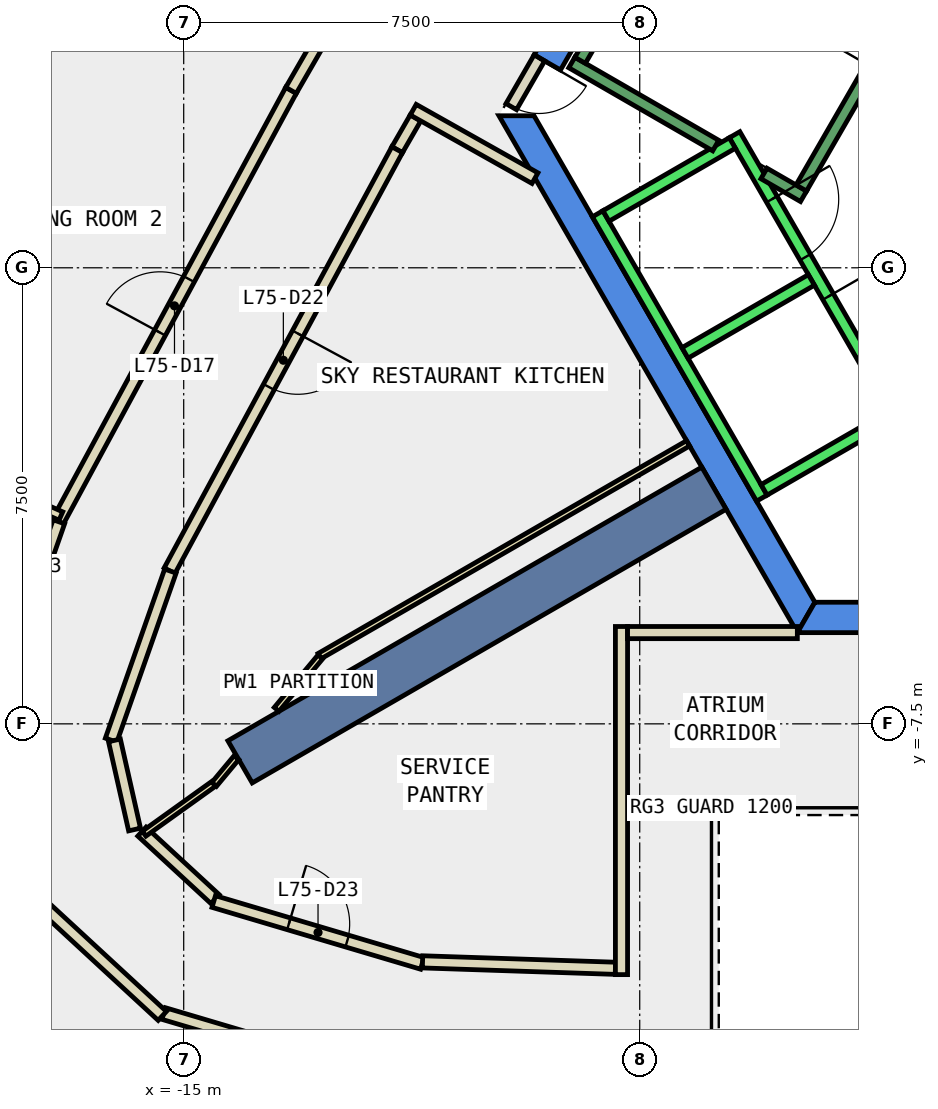
"""IFC4 building model, lengths in metres.
Left out: names, types, materials, properties, quantities, classifications, styles, units other than length and angle.
Written with IfcOpenShell. Run it as: python <this file> out.ifc"""

import sys

from ifc_helpers import new_model, si_unit, direction, frame, frame_2d, origin, place, context, subcontext, project, spatial, polyline, rectangle, outline, extrude, element, fill, save


model = new_model("IFC4")
c1 = context("Model", 3, precision=1e-05, world=origin(), true_north=direction((0.0, 1.0)))
c2 = subcontext(c1, "Body", "Model", "MODEL_VIEW")
j1 = project(units=[si_unit("LENGTHUNIT", "METRE"), si_unit("PLANEANGLEUNIT", "RADIAN")], contexts=[c1])
p1 = place(None, origin())
s1 = spatial("IfcSite", under=j1, at=p1, CompositionType="ELEMENT")
p2 = place(p1, origin())
s2 = spatial("IfcBuilding", under=s1, at=p2, CompositionType="ELEMENT")
p3 = place(p2, frame((0.0, 0.0, 318.8)))
s3 = spatial("IfcBuildingStorey", under=s2, at=p3, CompositionType="ELEMENT", Elevation=318.8)
p4 = place(p3, frame((0.0, 0.0, -0.34)))
e1 = element("IfcWall", 1, at=p4, inside=s3, PredefinedType="SHEAR", context=c2, shape_type="SweptSolid", body=[
    extrude(outline(polyline([(-9.236, 3.502), (-8.803, 3.253), (-4.619, 10.5), (-4.907, 11.0), (-9.236, 3.502)])), origin(), (0.0, 0.0, 1.0), 3.6),
])
p5 = place(p3, frame((0.0, 0.0, -0.34)))
e2 = element("IfcWall", 2, at=p5, inside=s3, PredefinedType="SHEAR", context=c2, shape_type="SweptSolid", body=[
    extrude(outline(polyline([(-9.815, 2.5), (-4.907, -6.0), (-4.619, -5.5), (-9.238, 2.5), (-9.815, 2.5)])), origin(), (0.0, 0.0, 1.0), 3.6),
])
p6 = place(p3, frame((0.0, 0.0, -0.34)))
e3 = element("IfcWall", 3, at=p6, inside=s3, PredefinedType="SHEAR", context=c2, shape_type="SweptSolid", body=[
    extrude(outline(polyline([(3.75, -6.0), (3.75, -5.5), (-4.619, -5.5), (-4.907, -6.0), (3.75, -6.0)])), origin(), (0.0, 0.0, 1.0), 3.6),
])
p7 = place(p3, frame((-6.279, -3.625, -0.34), z_axis=(0.0, 0.0, 1.0), x_axis=(-0.866017533419, -0.500013631625, 0.0)))
e4 = element("IfcWall", 4, at=p7, inside=s3, PredefinedType="SHEAR", context=c2, shape_type="SweptSolid", body=[
    extrude(rectangle(XDim=9.0, YDim=0.8, at=frame_2d((4.5, 0.0))), origin(), (0.0, 0.0, 1.0), 3.6),
])
p8 = place(p3, frame((-11.188, 2.464, 0.0), z_axis=(0.0, 0.0, 1.0), x_axis=(-0.499406844493, -0.866367591542, 0.0)))
e5 = element("IfcWall", 5, at=p8, inside=s3, PredefinedType="PARTITIONING", context=c2, shape_type="SweptSolid", body=[
    extrude(rectangle(XDim=0.603, YDim=0.2, at=frame_2d((0.301, 0.0))), origin(), (0.0, 0.0, 1.0), 3.26),
])
p9 = place(p3, frame((-11.489, 1.942, 0.0), z_axis=(0.0, 0.0, 1.0), x_axis=(-0.475643534049, -0.879638123615, 0.0)))
e6 = element("IfcWall", 6, at=p9, inside=s3, PredefinedType="PARTITIONING", context=c2, shape_type="SweptSolid", body=[
    extrude(rectangle(XDim=7.871, YDim=0.2, at=frame_2d((3.936, 0.0))), origin(), (0.0, 0.0, 1.0), 3.26),
])
p10 = place(p9, frame((3.436, 0.0, 0.0)))
e7 = element("IfcOpeningElement", 7, at=p10, cuts=e6, PredefinedType="OPENING", context=c2, shape_type="SweptSolid", body=[
    extrude(rectangle(XDim=1.0, YDim=2.1, at=frame_2d((0.5, 1.05))), frame((0.0, 0.11, 0.0), z_axis=(0.0, -1.0, 0.0), x_axis=(1.0, 0.0, 0.0)), (0.0, 0.0, 1.0), 0.22),
])
p11 = place(p3, frame((-15.219, -4.988, 0.0), z_axis=(0.0, 0.0, 1.0), x_axis=(-0.330981563235, -0.943637220969, 0.0)))
e8 = element("IfcWall", 8, at=p11, inside=s3, PredefinedType="PARTITIONING", context=c2, shape_type="SweptSolid", body=[
    extrude(rectangle(XDim=2.946, YDim=0.2, at=frame_2d((1.473, 0.0))), origin(), (0.0, 0.0, 1.0), 3.26),
])
p12 = place(p3, frame((-16.139, -7.772, 0.0), z_axis=(0.0, 0.0, 1.0), x_axis=(0.220111291919, -0.975474766034, 0.0)))
e9 = element("IfcWall", 9, at=p12, inside=s3, PredefinedType="PARTITIONING", context=c2, shape_type="SweptSolid", body=[
    extrude(rectangle(XDim=1.503, YDim=0.2, at=frame_2d((0.751, 0.0))), origin(), (0.0, 0.0, 1.0), 3.26),
])
p13 = place(p3, frame((-9.223, 1.474, 0.0), z_axis=(0.0, 0.0, 1.0), x_axis=(-0.871623785844, 0.490175454251, 0.0)))
e10 = element("IfcWall", 10, at=p13, inside=s3, PredefinedType="PARTITIONING", context=c2, shape_type="SweptSolid", body=[
    extrude(rectangle(XDim=2.297, YDim=0.2, at=frame_2d((1.148, 0.0))), origin(), (0.0, 0.0, 1.0), 3.26),
])
p14 = place(p3, frame((-15.687, -9.272, 0.0), z_axis=(0.0, 0.0, 1.0), x_axis=(0.734946370973, -0.67812523312, 0.0)))
e11 = element("IfcWall", 11, at=p14, inside=s3, PredefinedType="PARTITIONING", context=c2, shape_type="SweptSolid", body=[
    extrude(rectangle(XDim=1.637, YDim=0.2, at=frame_2d((0.818, 0.0))), origin(), (0.0, 0.0, 1.0), 3.26),
])
p15 = place(p3, frame((-14.506, -10.422, 0.0), z_axis=(0.0, 0.0, 1.0), x_axis=(0.958760241353, -0.284216114252, 0.0)))
e12 = element("IfcWall", 12, at=p15, inside=s3, PredefinedType="PARTITIONING", context=c2, shape_type="SweptSolid", body=[
    extrude(rectangle(XDim=3.578, YDim=0.2, at=frame_2d((1.789, 0.0))), origin(), (0.0, 0.0, 1.0), 3.26),
])
p16 = place(p15, frame((1.289, 0.0, 0.0)))
e13 = element("IfcOpeningElement", 13, at=p16, cuts=e12, PredefinedType="OPENING", context=c2, shape_type="SweptSolid", body=[
    extrude(rectangle(XDim=1.0, YDim=2.1, at=frame_2d((0.5, 1.05))), frame((0.0, 0.11, 0.0), z_axis=(0.0, -1.0, 0.0), x_axis=(1.0, 0.0, 0.0)), (0.0, 0.0, 1.0), 0.22),
])
p17 = place(p3, frame((-11.072, -11.414, 0.0), z_axis=(0.0, 0.0, 1.0), x_axis=(0.999442599499, -0.033383982774, 0.0)))
e14 = element("IfcWall", 14, at=p17, inside=s3, PredefinedType="PARTITIONING", context=c2, shape_type="SweptSolid", body=[
    extrude(rectangle(XDim=3.174, YDim=0.2, at=frame_2d((1.587, 0.0))), origin(), (0.0, 0.0, 1.0), 3.26),
])
p18 = place(p3, frame((-17.068, -4.17, 0.0), z_axis=(0.0, 0.0, 1.0), x_axis=(0.475681790703, 0.879617436158, 0.0)))
e15 = element("IfcWall", 15, at=p18, inside=s3, PredefinedType="PARTITIONING", context=c2, shape_type="SweptSolid", body=[
    extrude(rectangle(XDim=8.058, YDim=0.2, at=frame_2d((4.029, 0.0))), origin(), (0.0, 0.0, 1.0), 3.26),
])
p19 = place(p18, frame((3.529, 0.0, 0.0)))
e16 = element("IfcOpeningElement", 16, at=p19, cuts=e15, PredefinedType="OPENING", context=c2, shape_type="SweptSolid", body=[
    extrude(rectangle(XDim=1.0, YDim=2.1, at=frame_2d((0.5, 1.05))), frame((0.0, 0.11, 0.0), z_axis=(0.0, -1.0, 0.0), x_axis=(1.0, 0.0, 0.0)), (0.0, 0.0, 1.0), 0.22),
])
p20 = place(p3, frame((-13.235, 2.918, 0.0), z_axis=(0.0, 0.0, 1.0), x_axis=(0.49992599743, 0.866068124973, 0.0)))
e17 = element("IfcWall", 17, at=p20, inside=s3, PredefinedType="PARTITIONING", context=c2, shape_type="SweptSolid", body=[
    extrude(rectangle(XDim=4.015, YDim=0.2, at=frame_2d((2.007, 0.0))), origin(), (0.0, 0.0, 1.0), 3.26),
])
p21 = place(p3, frame((-13.22, -12.889, 0.0), z_axis=(0.0, 0.0, 1.0), x_axis=(-0.958789155152, 0.284118559693, 0.0)))
e18 = element("IfcWall", 18, at=p21, inside=s3, PredefinedType="PARTITIONING", context=c2, shape_type="SweptSolid", body=[
    extrude(rectangle(XDim=2.2, YDim=0.2, at=frame_2d((1.1, 0.0))), origin(), (0.0, 0.0, 1.0), 3.26),
])
p22 = place(p3, frame((-15.352, -12.303, 0.0), z_axis=(0.0, 0.0, 1.0), x_axis=(-0.734786003021, 0.67829899732, 0.0)))
e19 = element("IfcWall", 19, at=p22, inside=s3, PredefinedType="PARTITIONING", context=c2, shape_type="SweptSolid", body=[
    extrude(rectangle(XDim=3.22, YDim=0.2, at=frame_2d((1.61, 0.0))), origin(), (0.0, 0.0, 1.0), 3.26),
])
p23 = place(p3, frame((-18.271, -7.648, 0.0), z_axis=(0.0, 0.0, 1.0), x_axis=(0.33112192567, 0.943587977001, 0.0)))
e20 = element("IfcWall", 20, at=p23, inside=s3, PredefinedType="PARTITIONING", context=c2, shape_type="SweptSolid", body=[
    extrude(rectangle(XDim=3.678, YDim=0.2, at=frame_2d((1.839, 0.0))), origin(), (0.0, 0.0, 1.0), 3.26),
])
p24 = place(p23, frame((1.339, 0.0, 0.0)))
e21 = element("IfcOpeningElement", 21, at=p24, cuts=e20, PredefinedType="OPENING", context=c2, shape_type="SweptSolid", body=[
    extrude(rectangle(XDim=1.0, YDim=2.1, at=frame_2d((0.5, 1.05))), frame((0.0, 0.11, 0.0), z_axis=(0.0, -1.0, 0.0), x_axis=(1.0, 0.0, 0.0)), (0.0, 0.0, 1.0), 0.22),
])
p25 = place(p3, frame((-7.8, -11.624, 0.0), z_axis=(0.0, 0.0, 1.0), x_axis=(0.0, 1.0, 0.0)))
e22 = element("IfcWall", 22, at=p25, inside=s3, PredefinedType="PARTITIONING", context=c2, shape_type="SweptSolid", body=[
    extrude(rectangle(XDim=5.725, YDim=0.2, at=frame_2d((2.863, 0.0))), origin(), (0.0, 0.0, 1.0), 3.26),
])
p26 = place(p3, frame((-7.7, -5.999, 0.0), z_axis=(0.0, 0.0, 1.0), x_axis=(1.0, 0.0, 0.0)))
e23 = element("IfcWall", 23, at=p26, inside=s3, PredefinedType="PARTITIONING", context=c2, shape_type="SweptSolid", body=[
    extrude(rectangle(XDim=2.792, YDim=0.2, at=frame_2d((1.396, 0.0))), origin(), (0.0, 0.0, 1.0), 3.26),
])
p27 = place(p3, frame((-6.705, -2.887, 0.0), z_axis=(0.0, 0.0, 1.0), x_axis=(-0.866001397039, -0.500041578597, 0.0)))
e24 = element("IfcWall", 24, at=p27, inside=s3, PredefinedType="PARTITIONING", context=c2, shape_type="SweptSolid", body=[
    extrude(rectangle(XDim=6.998, YDim=0.1, at=frame_2d((3.499, 0.0))), origin(), (0.0, 0.0, 1.0), 3.26),
])
p28 = place(p3, frame((-12.753, -6.399, 0.0), z_axis=(0.0, 0.0, 1.0), x_axis=(-0.640077503072, -0.768310347491, 0.0)))
e25 = element("IfcWall", 25, at=p28, inside=s3, PredefinedType="PARTITIONING", context=c2, shape_type="SweptSolid", body=[
    extrude(rectangle(XDim=1.123, YDim=0.1, at=frame_2d((0.562, 0.0))), origin(), (0.0, 0.0, 1.0), 3.26),
])
p29 = place(p3, frame((-14.507, -8.486, 0.0), z_axis=(0.0, 0.0, 1.0), x_axis=(-0.812782900134, -0.582566697684, 0.0)))
e26 = element("IfcWall", 26, at=p29, inside=s3, PredefinedType="PARTITIONING", context=c2, shape_type="SweptSolid", body=[
    extrude(rectangle(XDim=1.407, YDim=0.1, at=frame_2d((0.704, 0.0))), origin(), (0.0, 0.0, 1.0), 3.26),
])
p30 = place(p3, frame((-17.02, -4.082, 0.0), z_axis=(0.0, 0.0, 1.0), x_axis=(-0.914599611743, 0.404360668462, 0.0)))
e27 = element("IfcWall", 27, at=p30, inside=s3, PredefinedType="PARTITIONING", context=c2, shape_type="SweptSolid", body=[
    extrude(rectangle(XDim=4.296, YDim=0.15, at=frame_2d((2.148, 0.0))), origin(), (0.0, 0.0, 1.0), 3.26),
])
p31 = place(p3, frame((-9.15, 3.452, 0.0), z_axis=(0.0, 0.0, 1.0), x_axis=(-0.500079945886, -0.865979242085, 0.0)))
e28 = element("IfcWall", 28, at=p31, inside=s3, PredefinedType="PARTITIONING", context=c2, shape_type="SweptSolid", body=[
    extrude(rectangle(XDim=0.926, YDim=0.2, at=frame_2d((0.463, 0.0))), origin(), (0.0, 0.0, 1.0), 2.4),
])
p32 = place(p31, frame((0.017, 0.0, 0.0)))
e29 = element("IfcOpeningElement", 29, at=p32, cuts=e28, PredefinedType="OPENING", context=c2, shape_type="SweptSolid", body=[
    extrude(rectangle(XDim=0.9, YDim=2.1, at=frame_2d((0.45, 1.05))), frame((0.0, 0.11, 0.0), z_axis=(0.0, -1.0, 0.0), x_axis=(1.0, 0.0, 0.0)), (0.0, 0.0, 1.0), 0.22),
])
p33 = place(p3, frame((-14.133, -8.056, 0.0), z_axis=(0.0, 0.0, 1.0), x_axis=(-0.640142394154, -0.768256282244, 0.0)))
e30 = element("IfcWall", 30, at=p33, inside=s3, PredefinedType="PARTITIONING", context=c2, shape_type="SweptSolid", body=[
    extrude(rectangle(XDim=0.572, YDim=0.1, at=frame_2d((0.286, 0.0))), origin(), (0.0, 0.0, 1.0), 3.26),
])
p34 = place(p3, frame((-5.94, 2.188, 0.0), z_axis=(0.0, 0.0, 1.0), x_axis=(0.500034260056, -0.866005622828, 0.0)))
e31 = element("IfcWall", 31, at=p34, inside=s3, PredefinedType="STANDARD", context=c2, shape_type="SweptSolid", body=[
    extrude(rectangle(XDim=5.399, YDim=0.2, at=frame_2d((2.7, 0.0))), origin(), (0.0, 0.0, 1.0), 3.26),
])
p35 = place(p34, frame((3.075, 0.0, 0.0)))
e32 = element("IfcOpeningElement", 32, at=p35, cuts=e31, PredefinedType="OPENING", context=c2, shape_type="SweptSolid", body=[
    extrude(rectangle(XDim=1.1, YDim=2.1, at=frame_2d((0.55, 1.05))), frame((0.0, 0.11, 0.0), z_axis=(0.0, -1.0, 0.0), x_axis=(1.0, 0.0, 0.0)), (0.0, 0.0, 1.0), 0.22),
])
p36 = place(p34, frame((1.225, 0.0, 0.0)))
e33 = element("IfcOpeningElement", 33, at=p36, cuts=e31, PredefinedType="OPENING", context=c2, shape_type="SweptSolid", body=[
    extrude(rectangle(XDim=1.1, YDim=2.1, at=frame_2d((0.55, 1.05))), frame((0.0, 0.11, 0.0), z_axis=(0.0, -1.0, 0.0), x_axis=(1.0, 0.0, 0.0)), (0.0, 0.0, 1.0), 0.22),
])
p37 = place(p3, frame((-8.192, 0.888, 0.0), z_axis=(0.0, 0.0, 1.0), x_axis=(0.500034260056, -0.866005622828, 0.0)))
e34 = element("IfcWall", 34, at=p37, inside=s3, PredefinedType="STANDARD", context=c2, shape_type="SweptSolid", body=[
    extrude(rectangle(XDim=5.399, YDim=0.2, at=frame_2d((2.7, 0.0))), origin(), (0.0, 0.0, 1.0), 3.26),
])
for number, where, z_axis, x_axis in (
    (35, (-5.977, 2.052, 0.0), (0.0, 0.0, 1.0), (-0.866, -0.5, 0.0)),
    (36, (-4.677, -0.2, 0.0), (0.0, 0.0, 1.0), (-0.866, -0.5, 0.0)),
):
    element("IfcWall", number, at=place(p3, frame(where, z_axis=z_axis, x_axis=x_axis)), inside=s3, PredefinedType="STANDARD", context=c2, shape_type="SweptSolid", body=[
        extrude(rectangle(XDim=2.399, YDim=0.2, at=frame_2d((1.2, 0.0))), origin(), (0.0, 0.0, 1.0), 3.26),
    ])
p38 = place(p3, frame((-3.377, -2.452, 0.0), z_axis=(0.0, 0.0, 1.0), x_axis=(-0.865955154139, -0.50012165622, 0.0)))
e37 = element("IfcWall", 37, at=p38, inside=s3, PredefinedType="STANDARD", context=c2, shape_type="SweptSolid", body=[
    extrude(rectangle(XDim=2.4, YDim=0.2, at=frame_2d((1.2, 0.0))), origin(), (0.0, 0.0, 1.0), 3.26),
])
p39 = place(p3, frame((-6.25, 2.01, 0.0), z_axis=(0.0, 0.0, 1.0), x_axis=(-0.86611865017, 0.499838457731, 0.0)))
e38 = element("IfcWall", 38, at=p39, inside=s3, PredefinedType="STANDARD", context=c2, shape_type="SweptSolid", body=[
    extrude(rectangle(XDim=2.733, YDim=0.2, at=frame_2d((1.366, 0.0))), origin(), (0.0, 0.0, 1.0), 3.26),
])
p40 = place(p3, frame((-4.806, 1.176, 0.0), z_axis=(0.0, 0.0, 1.0), x_axis=(-0.866558586415, 0.499075361355, 0.0)))
e39 = element("IfcWall", 39, at=p40, inside=s3, PredefinedType="STANDARD", context=c2, shape_type="SweptSolid", body=[
    extrude(rectangle(XDim=0.751, YDim=0.2, at=frame_2d((0.376, 0.0))), origin(), (0.0, 0.0, 1.0), 3.26),
])
p41 = place(p3, frame((-1.393, 7.288, 0.0), z_axis=(0.0, 0.0, 1.0), x_axis=(-0.499963383562, -0.866046543262, 0.0)))
e40 = element("IfcWall", 40, at=p41, inside=s3, PredefinedType="STANDARD", context=c2, shape_type="SweptSolid", body=[
    extrude(rectangle(XDim=6.9, YDim=0.2, at=frame_2d((3.45, 0.0))), origin(), (0.0, 0.0, 1.0), 3.26),
])
p42 = place(p41, frame((0.45, 0.0, 0.0)))
e41 = element("IfcOpeningElement", 41, at=p42, cuts=e40, PredefinedType="OPENING", context=c2, shape_type="SweptSolid", body=[
    extrude(rectangle(XDim=1.1, YDim=2.2, at=frame_2d((0.55, 1.1))), frame((0.0, 0.11, 0.0), z_axis=(0.0, -1.0, 0.0), x_axis=(1.0, 0.0, 0.0)), (0.0, 0.0, 1.0), 0.22),
])
p43 = place(p3, frame((-5.03, 9.388, 0.0), z_axis=(0.0, 0.0, 1.0), x_axis=(-0.499978703459, -0.866037698999, 0.0)))
e42 = element("IfcWall", 42, at=p43, inside=s3, PredefinedType="STANDARD", context=c2, shape_type="SweptSolid", body=[
    extrude(rectangle(XDim=6.9, YDim=0.2, at=frame_2d((3.45, 0.0))), origin(), (0.0, 0.0, 1.0), 3.26),
])
p44 = place(p19, origin())
e43 = element("IfcDoor", 43, at=p44, inside=s3, OperationType="SINGLE_SWING_LEFT", PredefinedType="DOOR", context=c2, shape_type="SweptSolid", body=[
    extrude(rectangle(XDim=1.0, YDim=2.1, at=frame_2d((0.5, 1.05))), frame((0.0, 0.025, 0.0), z_axis=(0.0, -1.0, 0.0), x_axis=(1.0, 0.0, 0.0)), (0.0, 0.0, 1.0), 0.05),
])
fill(e16, e43)
p45 = place(p10, origin())
e44 = element("IfcDoor", 44, at=p45, inside=s3, OperationType="SINGLE_SWING_LEFT", PredefinedType="DOOR", context=c2, shape_type="SweptSolid", body=[
    extrude(rectangle(XDim=1.0, YDim=2.1, at=frame_2d((0.5, 1.05))), frame((0.0, 0.025, 0.0), z_axis=(0.0, -1.0, 0.0), x_axis=(1.0, 0.0, 0.0)), (0.0, 0.0, 1.0), 0.05),
])
fill(e7, e44)
p46 = place(p16, origin())
e45 = element("IfcDoor", 45, at=p46, inside=s3, OperationType="SINGLE_SWING_RIGHT", PredefinedType="DOOR", context=c2, shape_type="SweptSolid", body=[
    extrude(rectangle(XDim=1.0, YDim=2.1, at=frame_2d((0.5, 1.05))), frame((0.0, 0.025, 0.0), z_axis=(0.0, -1.0, 0.0), x_axis=(1.0, 0.0, 0.0)), (0.0, 0.0, 1.0), 0.05),
])
fill(e13, e45)
p47 = place(p32, origin())
e46 = element("IfcDoor", 46, at=p47, inside=s3, OperationType="SINGLE_SWING_LEFT", PredefinedType="DOOR", context=c2, shape_type="SweptSolid", body=[
    extrude(rectangle(XDim=0.9, YDim=2.1, at=frame_2d((0.45, 1.05))), frame((0.0, 0.025, 0.0), z_axis=(0.0, -1.0, 0.0), x_axis=(1.0, 0.0, 0.0)), (0.0, 0.0, 1.0), 0.05),
])
fill(e29, e46)
p48 = place(p35, origin())
e47 = element("IfcDoor", 47, at=p48, inside=s3, OperationType="SLIDING_TO_LEFT", PredefinedType="DOOR", context=c2, shape_type="SweptSolid", body=[
    extrude(rectangle(XDim=1.1, YDim=2.1, at=frame_2d((0.55, 1.05))), frame((0.0, 0.025, 0.0), z_axis=(0.0, -1.0, 0.0), x_axis=(1.0, 0.0, 0.0)), (0.0, 0.0, 1.0), 0.05),
])
fill(e32, e47)
p49 = place(p36, origin())
e48 = element("IfcDoor", 48, at=p49, inside=s3, OperationType="SLIDING_TO_LEFT", PredefinedType="DOOR", context=c2, shape_type="SweptSolid", body=[
    extrude(rectangle(XDim=1.1, YDim=2.1, at=frame_2d((0.55, 1.05))), frame((0.0, 0.025, 0.0), z_axis=(0.0, -1.0, 0.0), x_axis=(1.0, 0.0, 0.0)), (0.0, 0.0, 1.0), 0.05),
])
fill(e33, e48)
save(model, sys.argv[1])
